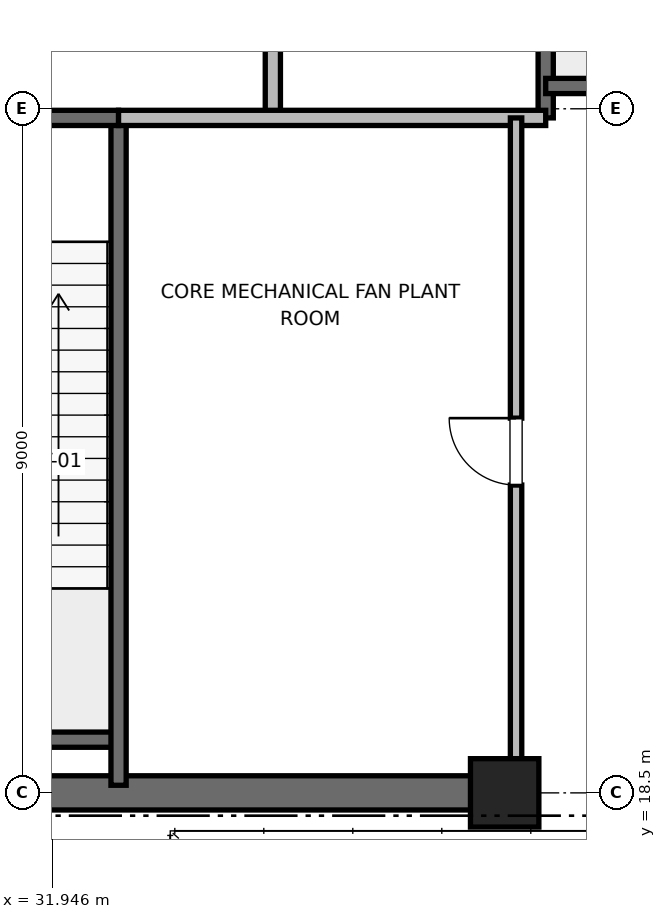
"""IFC4 building model, lengths in metres.
Left out: names, types, materials, properties, quantities, classifications, styles, units other than length and angle.
Written with IfcOpenShell. Run it as: python <this file> out.ifc"""

import sys

from ifc_helpers import new_model, si_unit, direction, frame, frame_2d, origin, origin_2d, place, context, subcontext, project, spatial, rectangle, extrude, element, fill, save


model = new_model("IFC4")
c1 = context("Model", 3, precision=1e-05, world=origin(), true_north=direction((0.0, 1.0)))
c2 = subcontext(c1, "Body", "Model", "MODEL_VIEW")
j1 = project(units=[si_unit("LENGTHUNIT", "METRE"), si_unit("PLANEANGLEUNIT", "RADIAN")], contexts=[c1])
p1 = place(None, origin())
s1 = spatial("IfcSite", under=j1, at=p1, CompositionType="ELEMENT")
p2 = place(p1, origin())
s2 = spatial("IfcBuilding", under=s1, at=p2, CompositionType="ELEMENT")
p3 = place(p2, frame((0.0, 0.0, 301.0)))
s3 = spatial("IfcBuildingStorey", under=s2, at=p3, CompositionType="ELEMENT", Elevation=301.0)
p4 = place(p3, frame((37.9, 18.5, 0.0), z_axis=(0.0, 0.0, 1.0), x_axis=(1.0, 0.0, 0.0)))
e1 = element("IfcColumn", 1, at=p4, inside=s3, PredefinedType="PILASTER", context=c2, shape_type="SweptSolid", body=[
    extrude(rectangle(XDim=0.9, YDim=0.9, at=origin_2d()), origin(), (0.0, 0.0, 1.0), 5.8),
])
p5 = place(p3, frame((29.0, 18.5, 0.0), z_axis=(0.0, 0.0, 1.0), x_axis=(1.0, 0.0, 0.0)))
e2 = element("IfcWall", 2, at=p5, inside=s3, PredefinedType="SHEAR", context=c2, shape_type="SweptSolid", body=[
    extrude(rectangle(XDim=9.2, YDim=0.45, at=frame_2d((4.6, 0.0))), origin(), (0.0, 0.0, 1.0), 5.585),
])
p6 = place(p3, frame((29.7, 19.2, 0.0), z_axis=(0.0, 0.0, 1.0), x_axis=(1.0, 0.0, 0.0)))
e3 = element("IfcWall", 3, at=p6, inside=s3, PredefinedType="SOLIDWALL", context=c2, shape_type="SweptSolid", body=[
    extrude(rectangle(XDim=3.12, YDim=0.2, at=frame_2d((1.56, 0.0))), origin(), (0.0, 0.0, 1.0), 5.585),
])
p7 = place(p3, frame((32.82, 18.6, 0.0), z_axis=(0.0, 0.0, 1.0), x_axis=(0.0, 1.0, 0.0)))
e4 = element("IfcWall", 4, at=p7, inside=s3, PredefinedType="SOLIDWALL", context=c2, shape_type="SweptSolid", body=[
    extrude(rectangle(XDim=8.78, YDim=0.2, at=frame_2d((4.39, 0.0))), origin(), (0.0, 0.0, 1.0), 5.585),
])
p8 = place(p3, frame((29.7, 27.38, 0.0), z_axis=(0.0, 0.0, 1.0), x_axis=(1.0, 0.0, 0.0)))
e5 = element("IfcWall", 5, at=p8, inside=s3, PredefinedType="SOLIDWALL", context=c2, shape_type="SweptSolid", body=[
    extrude(rectangle(XDim=3.12, YDim=0.2, at=frame_2d((1.56, 0.0))), origin(), (0.0, 0.0, 1.0), 5.585),
])
p9 = place(p8, frame((1.01, 0.0, 0.0)))
e6 = element("IfcOpeningElement", 6, at=p9, cuts=e5, PredefinedType="OPENING", context=c2, shape_type="SweptSolid", body=[
    extrude(rectangle(XDim=1.1, YDim=2.15, at=frame_2d((0.55, 1.075))), frame((0.0, 0.1, 0.0), z_axis=(0.0, -1.0, 0.0), x_axis=(1.0, 0.0, 0.0)), (0.0, 0.0, 1.0), 0.2),
])
p10 = place(p3, frame((38.44, 27.38, 0.0), z_axis=(0.0, 0.0, 1.0), x_axis=(0.0, 1.0, 0.0)))
e7 = element("IfcWall", 7, at=p10, inside=s3, PredefinedType="SOLIDWALL", context=c2, shape_type="SweptSolid", body=[
    extrude(rectangle(XDim=8.87, YDim=0.2, at=frame_2d((4.435, 0.0))), origin(), (0.0, 0.0, 1.0), 5.585),
])
p11 = place(p3, frame((38.44, 27.8, 0.0), z_axis=(0.0, 0.0, 1.0), x_axis=(1.0, 0.0, 0.0)))
e8 = element("IfcWall", 8, at=p11, inside=s3, PredefinedType="SOLIDWALL", context=c2, shape_type="SweptSolid", body=[
    extrude(rectangle(XDim=3.32, YDim=0.2, at=frame_2d((1.66, 0.0))), origin(), (0.0, 0.0, 1.0), 5.585),
])
p12 = place(p3, frame((34.85, 27.38, 0.0), z_axis=(0.0, 0.0, 1.0), x_axis=(0.0, 1.0, 0.0)))
e9 = element("IfcWall", 9, at=p12, inside=s3, PredefinedType="PARTITIONING", context=c2, shape_type="SweptSolid", body=[
    extrude(rectangle(XDim=3.37, YDim=0.2, at=frame_2d((1.685, 0.0))), origin(), (0.0, 0.0, 1.0), 5.585),
])
p13 = place(p12, frame((1.11, 0.0, 0.0)))
e10 = element("IfcOpeningElement", 10, at=p13, cuts=e9, PredefinedType="OPENING", context=c2, shape_type="SweptSolid", body=[
    extrude(rectangle(XDim=1.15, YDim=2.2, at=frame_2d((0.575, 1.1))), frame((0.0, 0.1, 0.0), z_axis=(0.0, -1.0, 0.0), x_axis=(1.0, 0.0, 0.0)), (0.0, 0.0, 1.0), 0.2),
])
p14 = place(p3, frame((32.82, 27.38, 0.0), z_axis=(0.0, 0.0, 1.0), x_axis=(1.0, 0.0, 0.0)))
e11 = element("IfcWall", 11, at=p14, inside=s3, PredefinedType="PARTITIONING", context=c2, shape_type="SweptSolid", body=[
    extrude(rectangle(XDim=5.62, YDim=0.2, at=frame_2d((2.81, 0.0))), origin(), (0.0, 0.0, 1.0), 5.585),
])
p15 = place(p3, frame((38.05, 18.6, 0.0), z_axis=(0.0, 0.0, 1.0), x_axis=(0.0, 1.0, 0.0)))
e12 = element("IfcWall", 12, at=p15, inside=s3, PredefinedType="PARTITIONING", context=c2, shape_type="SweptSolid", body=[
    extrude(rectangle(XDim=8.78, YDim=0.15, at=frame_2d((4.39, 0.0))), origin(), (0.0, 0.0, 1.0), 2.85),
])
p16 = place(p15, frame((3.95, 0.0, 0.0)))
e13 = element("IfcOpeningElement", 13, at=p16, cuts=e12, PredefinedType="OPENING", context=c2, shape_type="SweptSolid", body=[
    extrude(rectangle(XDim=0.88, YDim=2.1, at=frame_2d((0.44, 1.05))), frame((0.0, 0.075, 0.0), z_axis=(0.0, -1.0, 0.0), x_axis=(1.0, 0.0, 0.0)), (0.0, 0.0, 1.0), 0.15),
])
p17 = place(p16, origin())
e14 = element("IfcDoor", 14, at=p17, inside=s3, OperationType="SINGLE_SWING_RIGHT", PredefinedType="DOOR", context=c2, shape_type="SweptSolid", body=[
    extrude(rectangle(XDim=0.88, YDim=2.1, at=frame_2d((0.44, 1.05))), frame((0.0, 0.025, 0.0), z_axis=(0.0, -1.0, 0.0), x_axis=(1.0, 0.0, 0.0)), (0.0, 0.0, 1.0), 0.05),
])
fill(e13, e14)
save(model, sys.argv[1])
